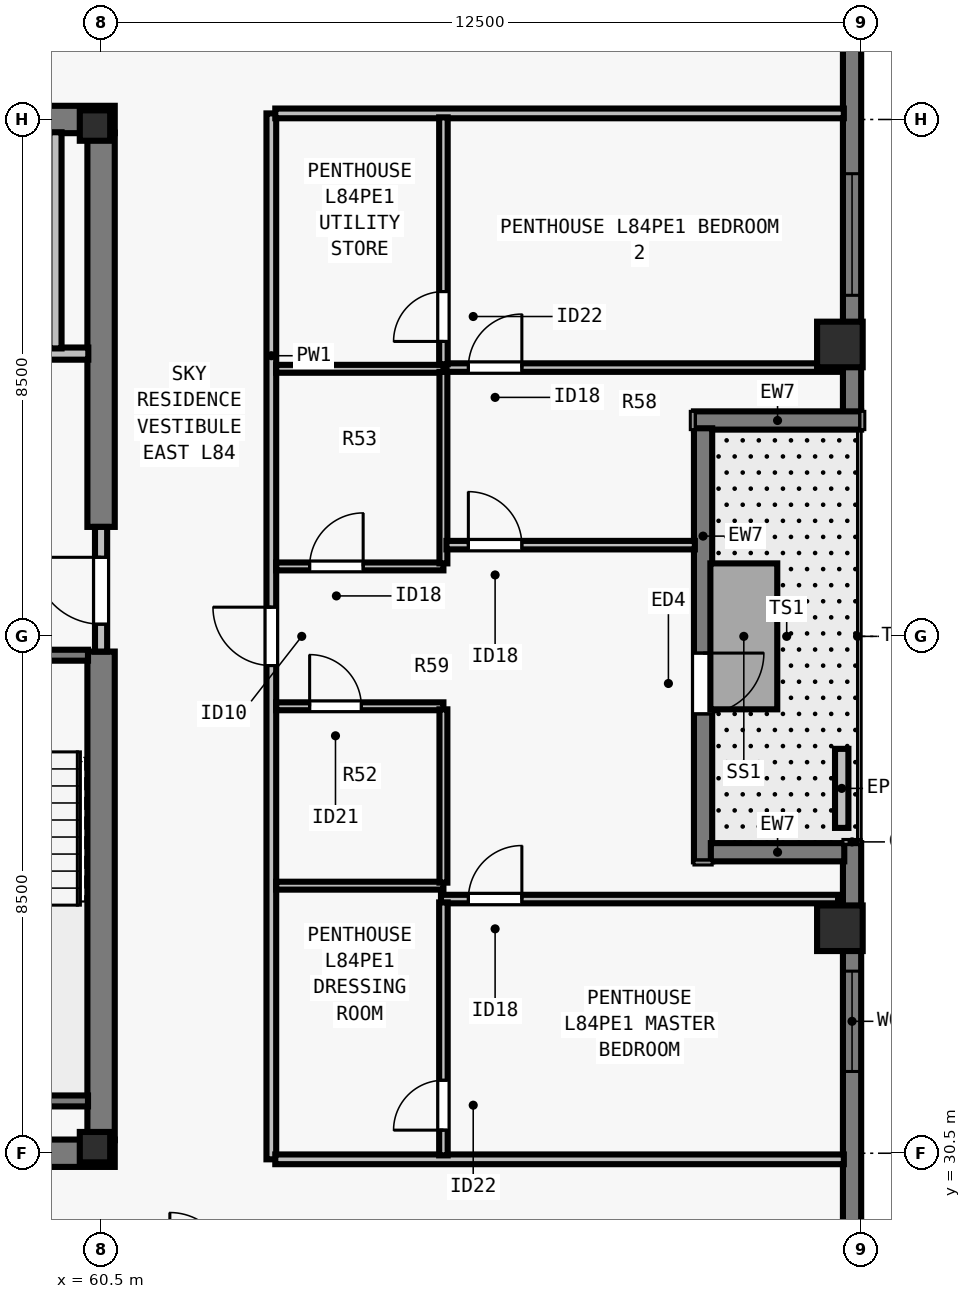
"""IFC4 building model, lengths in metres.
Left out: names, types, materials, properties, quantities, classifications, styles, units other than length and angle.
Written with IfcOpenShell. Run it as: python <this file> out.ifc"""

import sys

from ifc_helpers import new_model, si_unit, direction, frame, frame_2d, origin, origin_2d, place, context, subcontext, project, spatial, rectangle, i_section, extrude, element, fill, save


model = new_model("IFC4")
c1 = context("Model", 3, precision=1e-05, world=origin(), true_north=direction((0.0, 1.0)))
c2 = subcontext(c1, "Body", "Model", "MODEL_VIEW")
j1 = project(units=[si_unit("LENGTHUNIT", "METRE"), si_unit("PLANEANGLEUNIT", "RADIAN")], contexts=[c1])
p1 = place(None, origin())
s1 = spatial("IfcSite", under=j1, at=p1, CompositionType="ELEMENT")
p2 = place(p1, origin())
s2 = spatial("IfcBuilding", under=s1, at=p2, CompositionType="ELEMENT")
p3 = place(p2, frame((0.0, 0.0, 305.0)))
s3 = spatial("IfcBuildingStorey", under=s2, at=p3, CompositionType="ELEMENT", Elevation=305.0)
for number, where, z_axis, x_axis in (
    (1, (60.4, 30.6, 0.0), (0.0, 0.0, 1.0), (1.0, 0.0, 0.0)),
    (2, (60.4, 47.4, 0.0), (0.0, 0.0, 1.0), (1.0, 0.0, 0.0)),
):
    element("IfcColumn", number, at=place(p3, frame(where, z_axis=z_axis, x_axis=x_axis)), inside=s3, PredefinedType="COLUMN", context=c2, shape_type="SweptSolid", body=[
        extrude(i_section(OverallWidth=0.5, OverallDepth=0.5, WebThickness=0.028, FlangeThickness=0.045, at=origin_2d()), origin(), (0.0, 0.0, 1.0), 3.5),
    ])
for number, where, z_axis, x_axis in (
    (3, (72.65, 34.2, 0.0), (0.0, 0.0, 1.0), (0.0, 1.0, 0.0)),
    (4, (72.65, 43.8, 0.0), (0.0, 0.0, 1.0), (0.0, 1.0, 0.0)),
):
    element("IfcColumn", number, at=place(p3, frame(where, z_axis=z_axis, x_axis=x_axis)), inside=s3, PredefinedType="COLUMN", context=c2, shape_type="SweptSolid", body=[
        extrude(rectangle(XDim=0.75, YDim=0.75, at=origin_2d()), origin(), (0.0, 0.0, 1.0), 3.5),
    ])
p4 = place(p3, frame((72.85, 35.6, 0.0), z_axis=(0.0, 0.0, 1.0), x_axis=(0.0, -1.0, 0.0)))
e5 = element("IfcWall", 5, at=p4, inside=s3, PredefinedType="SOLIDWALL", context=c2, shape_type="SweptSolid", body=[
    extrude(rectangle(XDim=11.822, YDim=0.3, at=frame_2d((5.911, 0.0))), origin(), (0.0, 0.0, 1.0), 3.29),
])
p5 = place(p4, frame((2.105, 0.0, 0.8)))
e6 = element("IfcOpeningElement", 6, at=p5, cuts=e5, PredefinedType="OPENING", context=c2, shape_type="SweptSolid", body=[
    extrude(rectangle(XDim=1.65, YDim=1.758, at=frame_2d((0.825, 0.879))), frame((0.0, 0.16, 0.0), z_axis=(0.0, -1.0, 0.0), x_axis=(1.0, 0.0, 0.0)), (0.0, 0.0, 1.0), 0.32),
])
p6 = place(p3, frame((72.85, 54.5, 0.0), z_axis=(0.0, 0.0, 1.0), x_axis=(0.0, -1.0, 0.0)))
e7 = element("IfcWall", 7, at=p6, inside=s3, PredefinedType="SOLIDWALL", context=c2, shape_type="SweptSolid", body=[
    extrude(rectangle(XDim=11.822, YDim=0.3, at=frame_2d((5.911, 0.0))), origin(), (0.0, 0.0, 1.0), 3.29),
])
p7 = place(p6, frame((7.892, 0.0, 0.8)))
e8 = element("IfcOpeningElement", 8, at=p7, cuts=e7, PredefinedType="OPENING", context=c2, shape_type="SweptSolid", body=[
    extrude(rectangle(XDim=2.0, YDim=1.758, at=frame_2d((1.0, 0.879))), frame((0.0, 0.16, 0.0), z_axis=(0.0, -1.0, 0.0), x_axis=(1.0, 0.0, 0.0)), (0.0, 0.0, 1.0), 0.32),
])
p8 = place(p3, frame((73.0, 42.55, 0.0), z_axis=(0.0, 0.0, 1.0), x_axis=(-1.0, 0.0, 0.0)))
e9 = element("IfcWall", 9, at=p8, inside=s3, PredefinedType="SOLIDWALL", context=c2, shape_type="SweptSolid", body=[
    extrude(rectangle(XDim=2.75, YDim=0.3, at=frame_2d((1.375, 0.0))), origin(), (0.0, 0.0, 1.0), 3.29),
])
p9 = place(p3, frame((70.4, 42.422, 0.0), z_axis=(0.0, 0.0, 1.0), x_axis=(0.0, -1.0, 0.0)))
e10 = element("IfcWall", 10, at=p9, inside=s3, PredefinedType="SOLIDWALL", context=c2, shape_type="SweptSolid", body=[
    extrude(rectangle(XDim=7.122, YDim=0.3, at=frame_2d((3.561, 0.0))), origin(), (0.0, 0.0, 1.0), 3.29),
])
p10 = place(p9, frame((3.697, 0.0, 0.0)))
e11 = element("IfcOpeningElement", 11, at=p10, cuts=e10, PredefinedType="OPENING", context=c2, shape_type="SweptSolid", body=[
    extrude(rectangle(XDim=1.0, YDim=2.15, at=frame_2d((0.5, 1.075))), frame((0.0, 0.16, 0.0), z_axis=(0.0, -1.0, 0.0), x_axis=(1.0, 0.0, 0.0)), (0.0, 0.0, 1.0), 0.32),
])
p11 = place(p3, frame((70.528, 35.45, 0.0), z_axis=(0.0, 0.0, 1.0), x_axis=(1.0, 0.0, 0.0)))
e12 = element("IfcWall", 12, at=p11, inside=s3, PredefinedType="SOLIDWALL", context=c2, shape_type="SweptSolid", body=[
    extrude(rectangle(XDim=2.194, YDim=0.3, at=frame_2d((1.097, 0.0))), origin(), (0.0, 0.0, 1.0), 3.29),
])
p12 = place(p3, frame((72.68, 35.85, 0.0), z_axis=(0.0, 0.0, 1.0), x_axis=(0.0, 1.0, 0.0)))
e13 = element("IfcWall", 13, at=p12, inside=s3, PredefinedType="PARAPET", context=c2, shape_type="SweptSolid", body=[
    extrude(rectangle(XDim=1.3, YDim=0.22, at=frame_2d((0.65, 0.0))), origin(), (0.0, 0.0, 1.0), 0.55),
])
for number, where, z_axis, x_axis in (
    (14, (43.275, 30.5, 0.0), (0.0, 0.0, 1.0), (1.0, 0.0, 0.0)),
    (15, (43.275, 47.5, 0.0), (0.0, 0.0, 1.0), (1.0, 0.0, 0.0)),
):
    element("IfcWall", number, at=place(p3, frame(where, z_axis=z_axis, x_axis=x_axis)), inside=s3, PredefinedType="SHEAR", context=c2, shape_type="SweptSolid", body=[
        extrude(rectangle(XDim=17.45, YDim=0.45, at=frame_2d((8.725, 0.0))), origin(), (0.0, 0.0, 1.0), 3.29),
    ])
p13 = place(p3, frame((60.5, 30.715, 0.0), z_axis=(0.0, 0.0, 1.0), x_axis=(0.0, 1.0, 0.0)))
e16 = element("IfcWall", 16, at=p13, inside=s3, PredefinedType="SHEAR", context=c2, shape_type="SweptSolid", body=[
    extrude(rectangle(XDim=8.035, YDim=0.45, at=frame_2d((4.018, 0.0))), origin(), (0.0, 0.0, 1.0), 3.29),
])
p14 = place(p3, frame((60.5, 40.8, 0.0), z_axis=(0.0, 0.0, 1.0), x_axis=(0.0, 1.0, 0.0)))
e17 = element("IfcWall", 17, at=p14, inside=s3, PredefinedType="SHEAR", context=c2, shape_type="SweptSolid", body=[
    extrude(rectangle(XDim=6.485, YDim=0.45, at=frame_2d((3.242, 0.0))), origin(), (0.0, 0.0, 1.0), 3.29),
])
p15 = place(p3, frame((60.5, 38.75, 0.0), z_axis=(0.0, 0.0, 1.0), x_axis=(0.0, 1.0, 0.0)))
e18 = element("IfcWall", 18, at=p15, inside=s3, PredefinedType="SOLIDWALL", context=c2, shape_type="SweptSolid", body=[
    extrude(rectangle(XDim=2.05, YDim=0.2, at=frame_2d((1.025, 0.0))), origin(), (0.0, 0.0, 1.0), 3.29),
])
p16 = place(p15, frame((0.45, 0.0, 0.0)))
e19 = element("IfcOpeningElement", 19, at=p16, cuts=e18, PredefinedType="OPENING", context=c2, shape_type="SweptSolid", body=[
    extrude(rectangle(XDim=1.1, YDim=2.15, at=frame_2d((0.55, 1.075))), frame((0.0, 0.11, 0.0), z_axis=(0.0, -1.0, 0.0), x_axis=(1.0, 0.0, 0.0)), (0.0, 0.0, 1.0), 0.22),
])
p17 = place(p3, frame((56.735, 43.65, 0.0), z_axis=(0.0, 0.0, 1.0), x_axis=(1.0, 0.0, 0.0)))
e20 = element("IfcWall", 20, at=p17, inside=s3, PredefinedType="SOLIDWALL", context=c2, shape_type="SweptSolid", body=[
    extrude(rectangle(XDim=3.555, YDim=0.2, at=frame_2d((1.777, 0.0))), origin(), (0.0, 0.0, 1.0), 3.29),
])
p18 = place(p17, frame((1.295, 0.0, 0.0)))
e21 = element("IfcOpeningElement", 21, at=p18, cuts=e20, PredefinedType="OPENING", context=c2, shape_type="SweptSolid", body=[
    extrude(rectangle(XDim=1.1, YDim=2.2, at=frame_2d((0.55, 1.1))), frame((0.0, 0.11, 0.0), z_axis=(0.0, -1.0, 0.0), x_axis=(1.0, 0.0, 0.0)), (0.0, 0.0, 1.0), 0.22),
])
p19 = place(p3, frame((59.75, 43.735, 0.0), z_axis=(0.0, 0.0, 1.0), x_axis=(0.0, 1.0, 0.0)))
e22 = element("IfcWall", 22, at=p19, inside=s3, PredefinedType="SOLIDWALL", context=c2, shape_type="SweptSolid", body=[
    extrude(rectangle(XDim=3.555, YDim=0.2, at=frame_2d((1.777, 0.0))), origin(), (0.0, 0.0, 1.0), 3.29),
])
p20 = place(p3, frame((63.3, 30.4, 0.0), z_axis=(0.0, 0.0, 1.0), x_axis=(0.0, 1.0, 0.0)))
e23 = element("IfcWall", 23, at=p20, inside=s3, PredefinedType="PARTITIONING", context=c2, shape_type="SweptSolid", body=[
    extrude(rectangle(XDim=17.2, YDim=0.16, at=frame_2d((8.6, 0.0))), origin(), (0.0, 0.0, 1.0), 3.29),
])
p21 = place(p20, frame((8.12, 0.0, 0.0)))
e24 = element("IfcOpeningElement", 24, at=p21, cuts=e23, PredefinedType="OPENING", context=c2, shape_type="SweptSolid", body=[
    extrude(rectangle(XDim=0.96, YDim=2.18, at=frame_2d((0.48, 1.09))), frame((0.0, 0.09, 0.0), z_axis=(0.0, -1.0, 0.0), x_axis=(1.0, 0.0, 0.0)), (0.0, 0.0, 1.0), 0.18),
])
for number, where, z_axis, x_axis in (
    (25, (63.365, 30.4, 0.0), (0.0, 0.0, 1.0), (1.0, 0.0, 0.0)),
    (26, (63.365, 47.6, 0.0), (0.0, 0.0, 1.0), (1.0, 0.0, 0.0)),
):
    element("IfcWall", number, at=place(p3, frame(where, z_axis=z_axis, x_axis=x_axis)), inside=s3, PredefinedType="PARTITIONING", context=c2, shape_type="SweptSolid", body=[
        extrude(rectangle(XDim=9.35, YDim=0.16, at=frame_2d((4.675, 0.0))), origin(), (0.0, 0.0, 1.0), 3.29),
    ])
p22 = place(p3, frame((63.38, 34.9, 0.0), z_axis=(0.0, 0.0, 1.0), x_axis=(1.0, 0.0, 0.0)))
e27 = element("IfcWall", 27, at=p22, inside=s3, PredefinedType="PLUMBINGWALL", context=c2, shape_type="SweptSolid", body=[
    extrude(rectangle(XDim=2.75, YDim=0.13, at=frame_2d((1.375, 0.0))), origin(), (0.0, 0.0, 1.0), 3.29),
])
p23 = place(p3, frame((63.38, 37.85, 0.0), z_axis=(0.0, 0.0, 1.0), x_axis=(1.0, 0.0, 0.0)))
e28 = element("IfcWall", 28, at=p23, inside=s3, PredefinedType="PLUMBINGWALL", context=c2, shape_type="SweptSolid", body=[
    extrude(rectangle(XDim=2.75, YDim=0.13, at=frame_2d((1.375, 0.0))), origin(), (0.0, 0.0, 1.0), 3.29),
])
p24 = place(p23, frame((0.55, 0.0, 0.0)))
e29 = element("IfcOpeningElement", 29, at=p24, cuts=e28, PredefinedType="OPENING", context=c2, shape_type="SweptSolid", body=[
    extrude(rectangle(XDim=0.85, YDim=2.08, at=frame_2d((0.425, 1.04))), frame((0.0, 0.075, 0.0), z_axis=(0.0, -1.0, 0.0), x_axis=(1.0, 0.0, 0.0)), (0.0, 0.0, 1.0), 0.15),
])
p25 = place(p3, frame((66.13, 34.95, 0.0), z_axis=(0.0, 0.0, 1.0), x_axis=(0.0, 1.0, 0.0)))
e30 = element("IfcWall", 30, at=p25, inside=s3, PredefinedType="PLUMBINGWALL", context=c2, shape_type="SweptSolid", body=[
    extrude(rectangle(XDim=2.85, YDim=0.13, at=frame_2d((1.425, 0.0))), origin(), (0.0, 0.0, 1.0), 3.29),
])
p26 = place(p3, frame((63.38, 43.4, 0.0), z_axis=(0.0, 0.0, 1.0), x_axis=(1.0, 0.0, 0.0)))
e31 = element("IfcWall", 31, at=p26, inside=s3, PredefinedType="PLUMBINGWALL", context=c2, shape_type="SweptSolid", body=[
    extrude(rectangle(XDim=2.75, YDim=0.13, at=frame_2d((1.375, 0.0))), origin(), (0.0, 0.0, 1.0), 3.29),
])
p27 = place(p3, frame((63.38, 40.15, 0.0), z_axis=(0.0, 0.0, 1.0), x_axis=(1.0, 0.0, 0.0)))
e32 = element("IfcWall", 32, at=p27, inside=s3, PredefinedType="PLUMBINGWALL", context=c2, shape_type="SweptSolid", body=[
    extrude(rectangle(XDim=2.75, YDim=0.13, at=frame_2d((1.375, 0.0))), origin(), (0.0, 0.0, 1.0), 3.29),
])
p28 = place(p27, frame((0.55, 0.0, 0.0)))
e33 = element("IfcOpeningElement", 33, at=p28, cuts=e32, PredefinedType="OPENING", context=c2, shape_type="SweptSolid", body=[
    extrude(rectangle(XDim=0.88, YDim=2.1, at=frame_2d((0.44, 1.05))), frame((0.0, 0.075, 0.0), z_axis=(0.0, -1.0, 0.0), x_axis=(1.0, 0.0, 0.0)), (0.0, 0.0, 1.0), 0.15),
])
p29 = place(p3, frame((66.13, 40.2, 0.0), z_axis=(0.0, 0.0, 1.0), x_axis=(0.0, 1.0, 0.0)))
e34 = element("IfcWall", 34, at=p29, inside=s3, PredefinedType="PLUMBINGWALL", context=c2, shape_type="SweptSolid", body=[
    extrude(rectangle(XDim=3.15, YDim=0.13, at=frame_2d((1.575, 0.0))), origin(), (0.0, 0.0, 1.0), 3.29),
])
p30 = place(p3, frame((66.09, 34.68, 0.0), z_axis=(0.0, 0.0, 1.0), x_axis=(1.0, 0.0, 0.0)))
e35 = element("IfcWall", 35, at=p30, inside=s3, PredefinedType="PARTITIONING", context=c2, shape_type="SweptSolid", body=[
    extrude(rectangle(XDim=6.53, YDim=0.14, at=frame_2d((3.265, 0.0))), origin(), (0.0, 0.0, 1.0), 3.29),
])
p31 = place(p30, frame((0.45, 0.0, 0.0)))
e36 = element("IfcOpeningElement", 36, at=p31, cuts=e35, PredefinedType="OPENING", context=c2, shape_type="SweptSolid", body=[
    extrude(rectangle(XDim=0.88, YDim=2.1, at=frame_2d((0.44, 1.05))), frame((0.0, 0.08, 0.0), z_axis=(0.0, -1.0, 0.0), x_axis=(1.0, 0.0, 0.0)), (0.0, 0.0, 1.0), 0.16),
])
p32 = place(p3, frame((66.13, 30.465, 0.0), z_axis=(0.0, 0.0, 1.0), x_axis=(0.0, 1.0, 0.0)))
e37 = element("IfcWall", 37, at=p32, inside=s3, PredefinedType="PARTITIONING", context=c2, shape_type="SweptSolid", body=[
    extrude(rectangle(XDim=4.16, YDim=0.14, at=frame_2d((2.08, 0.0))), origin(), (0.0, 0.0, 1.0), 3.29),
])
p33 = place(p32, frame((0.415, 0.0, 0.0)))
e38 = element("IfcOpeningElement", 38, at=p33, cuts=e37, PredefinedType="OPENING", context=c2, shape_type="SweptSolid", body=[
    extrude(rectangle(XDim=0.82, YDim=2.1, at=frame_2d((0.41, 1.05))), frame((0.0, 0.08, 0.0), z_axis=(0.0, -1.0, 0.0), x_axis=(1.0, 0.0, 0.0)), (0.0, 0.0, 1.0), 0.16),
])
p34 = place(p3, frame((66.18, 43.42, 0.0), z_axis=(0.0, 0.0, 1.0), x_axis=(1.0, 0.0, 0.0)))
e39 = element("IfcWall", 39, at=p34, inside=s3, PredefinedType="PARTITIONING", context=c2, shape_type="SweptSolid", body=[
    extrude(rectangle(XDim=6.44, YDim=0.14, at=frame_2d((3.22, 0.0))), origin(), (0.0, 0.0, 1.0), 3.29),
])
p35 = place(p34, frame((0.36, 0.0, 0.0)))
e40 = element("IfcOpeningElement", 40, at=p35, cuts=e39, PredefinedType="OPENING", context=c2, shape_type="SweptSolid", body=[
    extrude(rectangle(XDim=0.88, YDim=2.1, at=frame_2d((0.44, 1.05))), frame((0.0, 0.08, 0.0), z_axis=(0.0, -1.0, 0.0), x_axis=(1.0, 0.0, 0.0)), (0.0, 0.0, 1.0), 0.16),
])
p36 = place(p3, frame((66.13, 43.475, 0.0), z_axis=(0.0, 0.0, 1.0), x_axis=(0.0, 1.0, 0.0)))
e41 = element("IfcWall", 41, at=p36, inside=s3, PredefinedType="PARTITIONING", context=c2, shape_type="SweptSolid", body=[
    extrude(rectangle(XDim=4.06, YDim=0.14, at=frame_2d((2.03, 0.0))), origin(), (0.0, 0.0, 1.0), 3.29),
])
p37 = place(p36, frame((0.375, 0.0, 0.0)))
e42 = element("IfcOpeningElement", 42, at=p37, cuts=e41, PredefinedType="OPENING", context=c2, shape_type="SweptSolid", body=[
    extrude(rectangle(XDim=0.82, YDim=2.1, at=frame_2d((0.41, 1.05))), frame((0.0, 0.08, 0.0), z_axis=(0.0, -1.0, 0.0), x_axis=(1.0, 0.0, 0.0)), (0.0, 0.0, 1.0), 0.16),
])
p38 = place(p3, frame((66.18, 40.5, 0.0), z_axis=(0.0, 0.0, 1.0), x_axis=(1.0, 0.0, 0.0)))
e43 = element("IfcWall", 43, at=p38, inside=s3, PredefinedType="PARTITIONING", context=c2, shape_type="SweptSolid", body=[
    extrude(rectangle(XDim=4.085, YDim=0.14, at=frame_2d((2.042, 0.0))), origin(), (0.0, 0.0, 1.0), 3.29),
])
p39 = place(p38, frame((0.36, 0.0, 0.0)))
e44 = element("IfcOpeningElement", 44, at=p39, cuts=e43, PredefinedType="OPENING", context=c2, shape_type="SweptSolid", body=[
    extrude(rectangle(XDim=0.88, YDim=2.1, at=frame_2d((0.44, 1.05))), frame((0.0, 0.08, 0.0), z_axis=(0.0, -1.0, 0.0), x_axis=(1.0, 0.0, 0.0)), (0.0, 0.0, 1.0), 0.16),
])
p40 = place(p3, frame((57.005, 38.69, 0.0), z_axis=(0.0, 0.0, 1.0), x_axis=(1.0, 0.0, 0.0)))
e45 = element("IfcWall", 45, at=p40, inside=s3, PredefinedType="SOLIDWALL", context=c2, shape_type="SweptSolid", body=[
    extrude(rectangle(XDim=3.28, YDim=0.18, at=frame_2d((1.64, 0.0))), origin(), (0.0, 0.0, 1.0), 3.29),
])
p41 = place(p40, frame((1.165, 0.0, 0.0)))
e46 = element("IfcOpeningElement", 46, at=p41, cuts=e45, PredefinedType="OPENING", context=c2, shape_type="SweptSolid", body=[
    extrude(rectangle(XDim=0.95, YDim=2.15, at=frame_2d((0.475, 1.075))), frame((0.0, 0.1, 0.0), z_axis=(0.0, -1.0, 0.0), x_axis=(1.0, 0.0, 0.0)), (0.0, 0.0, 1.0), 0.2),
])
p42 = place(p3, frame((57.005, 31.36, 0.0), z_axis=(0.0, 0.0, 1.0), x_axis=(1.0, 0.0, 0.0)))
e47 = element("IfcWall", 47, at=p42, inside=s3, PredefinedType="SOLIDWALL", context=c2, shape_type="SweptSolid", body=[
    extrude(rectangle(XDim=3.28, YDim=0.18, at=frame_2d((1.64, 0.0))), origin(), (0.0, 0.0, 1.0), 3.29),
])
p43 = place(p5, origin())
e48 = element("IfcWindow", 48, at=p43, inside=s3, PartitioningType="SINGLE_PANEL", PredefinedType="WINDOW", context=c2, shape_type="SweptSolid", body=[
    extrude(rectangle(XDim=1.65, YDim=1.758, at=frame_2d((0.825, 0.879))), frame((0.0, -0.05, 0.0), z_axis=(0.0, -1.0, 0.0), x_axis=(1.0, 0.0, 0.0)), (0.0, 0.0, 1.0), 0.06),
])
fill(e6, e48)
p44 = place(p7, origin())
e49 = element("IfcWindow", 49, at=p44, inside=s3, PartitioningType="SINGLE_PANEL", PredefinedType="WINDOW", context=c2, shape_type="SweptSolid", body=[
    extrude(rectangle(XDim=2.0, YDim=1.758, at=frame_2d((1.0, 0.879))), frame((0.0, -0.05, 0.0), z_axis=(0.0, -1.0, 0.0), x_axis=(1.0, 0.0, 0.0)), (0.0, 0.0, 1.0), 0.06),
])
fill(e8, e49)
p45 = place(p10, origin())
e50 = element("IfcDoor", 50, at=p45, inside=s3, OperationType="SINGLE_SWING_LEFT", PredefinedType="DOOR", context=c2, shape_type="SweptSolid", body=[
    extrude(rectangle(XDim=1.0, YDim=2.15, at=frame_2d((0.5, 1.075))), frame((0.0, 0.025, 0.0), z_axis=(0.0, -1.0, 0.0), x_axis=(1.0, 0.0, 0.0)), (0.0, 0.0, 1.0), 0.05),
])
fill(e11, e50)
p46 = place(p16, origin())
e51 = element("IfcDoor", 51, at=p46, inside=s3, OperationType="SINGLE_SWING_RIGHT", PredefinedType="DOOR", context=c2, shape_type="SweptSolid", body=[
    extrude(rectangle(XDim=1.1, YDim=2.15, at=frame_2d((0.55, 1.075))), frame((0.0, 0.025, 0.0), z_axis=(0.0, -1.0, 0.0), x_axis=(1.0, 0.0, 0.0)), (0.0, 0.0, 1.0), 0.05),
])
fill(e19, e51)
p47 = place(p24, origin())
e52 = element("IfcDoor", 52, at=p47, inside=s3, OperationType="SINGLE_SWING_LEFT", PredefinedType="DOOR", context=c2, shape_type="SweptSolid", body=[
    extrude(rectangle(XDim=0.85, YDim=2.08, at=frame_2d((0.425, 1.04))), frame((0.0, 0.025, 0.0), z_axis=(0.0, -1.0, 0.0), x_axis=(1.0, 0.0, 0.0)), (0.0, 0.0, 1.0), 0.05),
])
fill(e29, e52)
p48 = place(p28, origin())
e53 = element("IfcDoor", 53, at=p48, inside=s3, OperationType="SINGLE_SWING_RIGHT", PredefinedType="DOOR", context=c2, shape_type="SweptSolid", body=[
    extrude(rectangle(XDim=0.88, YDim=2.1, at=frame_2d((0.44, 1.05))), frame((0.0, 0.025, 0.0), z_axis=(0.0, -1.0, 0.0), x_axis=(1.0, 0.0, 0.0)), (0.0, 0.0, 1.0), 0.05),
])
fill(e33, e53)
p49 = place(p33, origin())
e54 = element("IfcDoor", 54, at=p49, inside=s3, OperationType="SINGLE_SWING_LEFT", PredefinedType="DOOR", context=c2, shape_type="SweptSolid", body=[
    extrude(rectangle(XDim=0.82, YDim=2.1, at=frame_2d((0.41, 1.05))), frame((0.0, 0.025, 0.0), z_axis=(0.0, -1.0, 0.0), x_axis=(1.0, 0.0, 0.0)), (0.0, 0.0, 1.0), 0.05),
])
fill(e38, e54)
p50 = place(p31, origin())
e55 = element("IfcDoor", 55, at=p50, inside=s3, OperationType="SINGLE_SWING_RIGHT", PredefinedType="DOOR", context=c2, shape_type="SweptSolid", body=[
    extrude(rectangle(XDim=0.88, YDim=2.1, at=frame_2d((0.44, 1.05))), frame((0.0, 0.025, 0.0), z_axis=(0.0, -1.0, 0.0), x_axis=(1.0, 0.0, 0.0)), (0.0, 0.0, 1.0), 0.05),
])
fill(e36, e55)
p51 = place(p37, origin())
e56 = element("IfcDoor", 56, at=p51, inside=s3, OperationType="SINGLE_SWING_LEFT", PredefinedType="DOOR", context=c2, shape_type="SweptSolid", body=[
    extrude(rectangle(XDim=0.82, YDim=2.1, at=frame_2d((0.41, 1.05))), frame((0.0, 0.025, 0.0), z_axis=(0.0, -1.0, 0.0), x_axis=(1.0, 0.0, 0.0)), (0.0, 0.0, 1.0), 0.05),
])
fill(e42, e56)
p52 = place(p35, origin())
e57 = element("IfcDoor", 57, at=p52, inside=s3, OperationType="SINGLE_SWING_RIGHT", PredefinedType="DOOR", context=c2, shape_type="SweptSolid", body=[
    extrude(rectangle(XDim=0.88, YDim=2.1, at=frame_2d((0.44, 1.05))), frame((0.0, 0.025, 0.0), z_axis=(0.0, -1.0, 0.0), x_axis=(1.0, 0.0, 0.0)), (0.0, 0.0, 1.0), 0.05),
])
fill(e40, e57)
p53 = place(p39, origin())
e58 = element("IfcDoor", 58, at=p53, inside=s3, OperationType="SINGLE_SWING_LEFT", PredefinedType="DOOR", context=c2, shape_type="SweptSolid", body=[
    extrude(rectangle(XDim=0.88, YDim=2.1, at=frame_2d((0.44, 1.05))), frame((0.0, 0.025, 0.0), z_axis=(0.0, -1.0, 0.0), x_axis=(1.0, 0.0, 0.0)), (0.0, 0.0, 1.0), 0.05),
])
fill(e44, e58)
p54 = place(p21, origin())
e59 = element("IfcDoor", 59, at=p54, inside=s3, OperationType="SINGLE_SWING_RIGHT", PredefinedType="DOOR", context=c2, shape_type="SweptSolid", body=[
    extrude(rectangle(XDim=0.96, YDim=2.18, at=frame_2d((0.48, 1.09))), frame((0.0, 0.025, 0.0), z_axis=(0.0, -1.0, 0.0), x_axis=(1.0, 0.0, 0.0)), (0.0, 0.0, 1.0), 0.05),
])
fill(e24, e59)
save(model, sys.argv[1])
